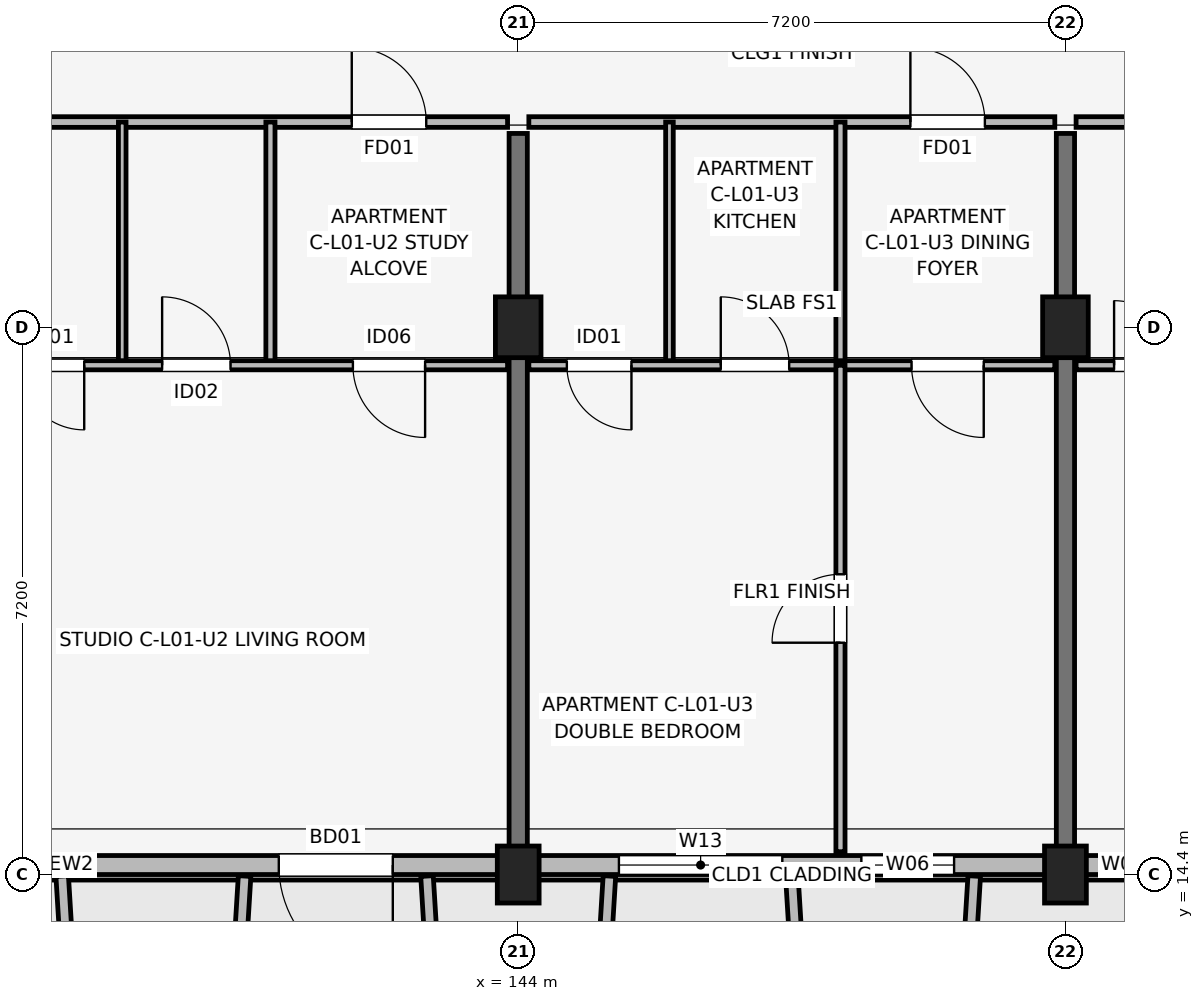
"""IFC4 building model, lengths in metres.
Left out: names, types, materials, properties, quantities, classifications, styles, units other than length and angle.
Written with IfcOpenShell. Run it as: python <this file> out.ifc"""

import sys

from ifc_helpers import new_model, si_unit, direction, frame, frame_2d, origin, origin_2d, place, context, subcontext, project, spatial, rectangle, extrude, element, fill, save


model = new_model("IFC4")
c1 = context("Model", 3, precision=1e-05, world=origin(), true_north=direction((0.0, 1.0)))
c2 = subcontext(c1, "Body", "Model", "MODEL_VIEW")
j1 = project(units=[si_unit("LENGTHUNIT", "METRE"), si_unit("PLANEANGLEUNIT", "RADIAN")], contexts=[c1])
p1 = place(None, origin())
s1 = spatial("IfcSite", under=j1, at=p1, CompositionType="ELEMENT")
p2 = place(p1, origin())
s2 = spatial("IfcBuilding", under=s1, at=p2, CompositionType="ELEMENT")
p3 = place(p2, frame((0.0, 0.0, 4.5)))
s3 = spatial("IfcBuildingStorey", under=s2, at=p3, CompositionType="ELEMENT", Elevation=4.5)
p4 = place(p3, frame((144.0, 14.4, 0.0), z_axis=(0.0, 0.0, 1.0), x_axis=(1.0, 0.0, 0.0)))
e1 = element("IfcColumn", 1, at=p4, inside=s3, PredefinedType="COLUMN", context=c2, shape_type="SweptSolid", body=[
    extrude(rectangle(XDim=0.55, YDim=0.75, at=origin_2d()), origin(), (0.0, 0.0, 1.0), 4.2),
])
p5 = place(p3, frame((144.0, 21.6, 0.0), z_axis=(0.0, 0.0, 1.0), x_axis=(1.0, 0.0, 0.0)))
e2 = element("IfcColumn", 2, at=p5, inside=s3, PredefinedType="COLUMN", context=c2, shape_type="SweptSolid", body=[
    extrude(rectangle(XDim=0.6, YDim=0.8, at=origin_2d()), origin(), (0.0, 0.0, 1.0), 4.2),
])
p6 = place(p3, frame((151.2, 14.4, 0.0), z_axis=(0.0, 0.0, 1.0), x_axis=(1.0, 0.0, 0.0)))
e3 = element("IfcColumn", 3, at=p6, inside=s3, PredefinedType="COLUMN", context=c2, shape_type="SweptSolid", body=[
    extrude(rectangle(XDim=0.55, YDim=0.75, at=origin_2d()), origin(), (0.0, 0.0, 1.0), 4.2),
])
p7 = place(p3, frame((151.2, 21.6, 0.0), z_axis=(0.0, 0.0, 1.0), x_axis=(1.0, 0.0, 0.0)))
e4 = element("IfcColumn", 4, at=p7, inside=s3, PredefinedType="COLUMN", context=c2, shape_type="SweptSolid", body=[
    extrude(rectangle(XDim=0.6, YDim=0.8, at=origin_2d()), origin(), (0.0, 0.0, 1.0), 4.2),
])
for number, where, z_axis, x_axis in (
    (5, (144.0, 14.75, 0.0), (0.0, 0.0, 1.0), (0.0, 1.0, 0.0)),
    (6, (151.2, 14.75, 0.0), (0.0, 0.0, 1.0), (0.0, 1.0, 0.0)),
):
    element("IfcWall", number, at=place(p3, frame(where, z_axis=z_axis, x_axis=x_axis)), inside=s3, PredefinedType="SHEAR", context=c2, shape_type="SweptSolid", body=[
        extrude(rectangle(XDim=9.4, YDim=0.24, at=frame_2d((4.7, 0.0))), origin(), (0.0, 0.0, 1.0), 4.2),
    ])
p8 = place(p3, frame((132.6, 14.525, 0.0), z_axis=(0.0, 0.0, 1.0), x_axis=(1.0, 0.0, 0.0)))
e7 = element("IfcWall", 7, at=p8, inside=s3, PredefinedType="SOLIDWALL", context=c2, shape_type="SweptSolid", body=[
    extrude(rectangle(XDim=30.0, YDim=0.25, at=frame_2d((15.0, 0.0))), origin(), (0.0, 0.0, 1.0), 3.48),
])
p9 = place(p8, frame((9.75, 0.0, 0.0), z_axis=(0.0, 0.0, 1.0), x_axis=(-1.0, 0.0, 0.0)))
e8 = element("IfcOpeningElement", 8, at=p9, cuts=e7, PredefinedType="OPENING", context=c2, shape_type="SweptSolid", body=[
    extrude(rectangle(XDim=1.5, YDim=2.15, at=frame_2d((0.75, 1.075))), frame((0.0, 0.135, 0.0), z_axis=(0.0, -1.0, 0.0), x_axis=(1.0, 0.0, 0.0)), (0.0, 0.0, 1.0), 0.27),
])
p10 = place(p8, frame((24.3, 0.0, 0.0), z_axis=(0.0, 0.0, 1.0), x_axis=(-1.0, 0.0, 0.0)))
e9 = element("IfcOpeningElement", 9, at=p10, cuts=e7, PredefinedType="OPENING", context=c2, shape_type="SweptSolid", body=[
    extrude(rectangle(XDim=1.8, YDim=2.15, at=frame_2d((0.9, 1.075))), frame((0.0, 0.135, 0.0), z_axis=(0.0, -1.0, 0.0), x_axis=(1.0, 0.0, 0.0)), (0.0, 0.0, 1.0), 0.27),
])
p11 = place(p8, frame((0.8, 0.0, 0.7)))
e10 = element("IfcOpeningElement", 10, at=p11, cuts=e7, PredefinedType="OPENING", context=c2, shape_type="SweptSolid", body=[
    extrude(rectangle(XDim=2.0, YDim=1.65, at=frame_2d((1.0, 0.825))), frame((0.0, 0.135, 0.0), z_axis=(0.0, -1.0, 0.0), x_axis=(1.0, 0.0, 0.0)), (0.0, 0.0, 1.0), 0.27),
])
p12 = place(p8, frame((12.725, 0.0, 0.7)))
e11 = element("IfcOpeningElement", 11, at=p12, cuts=e7, PredefinedType="OPENING", context=c2, shape_type="SweptSolid", body=[
    extrude(rectangle(XDim=2.15, YDim=1.65, at=frame_2d((1.075, 0.825))), frame((0.0, 0.135, 0.0), z_axis=(0.0, -1.0, 0.0), x_axis=(1.0, 0.0, 0.0)), (0.0, 0.0, 1.0), 0.27),
])
p13 = place(p8, frame((15.915, 0.0, 0.75)))
e12 = element("IfcOpeningElement", 12, at=p13, cuts=e7, PredefinedType="OPENING", context=c2, shape_type="SweptSolid", body=[
    extrude(rectangle(XDim=1.22, YDim=1.5, at=frame_2d((0.61, 0.75))), frame((0.0, 0.135, 0.0), z_axis=(0.0, -1.0, 0.0), x_axis=(1.0, 0.0, 0.0)), (0.0, 0.0, 1.0), 0.27),
])
p14 = place(p8, frame((19.058, 0.0, 0.75)))
e13 = element("IfcOpeningElement", 13, at=p14, cuts=e7, PredefinedType="OPENING", context=c2, shape_type="SweptSolid", body=[
    extrude(rectangle(XDim=0.6, YDim=1.25, at=frame_2d((0.3, 0.625))), frame((0.0, 0.135, 0.0), z_axis=(0.0, -1.0, 0.0), x_axis=(1.0, 0.0, 0.0)), (0.0, 0.0, 1.0), 0.27),
])
p15 = place(p8, frame((26.258, 0.0, 0.75)))
e14 = element("IfcOpeningElement", 14, at=p15, cuts=e7, PredefinedType="OPENING", context=c2, shape_type="SweptSolid", body=[
    extrude(rectangle(XDim=0.6, YDim=1.25, at=frame_2d((0.3, 0.625))), frame((0.0, 0.135, 0.0), z_axis=(0.0, -1.0, 0.0), x_axis=(1.0, 0.0, 0.0)), (0.0, 0.0, 1.0), 0.27),
])
p16 = place(p8, frame((28.3, 0.0, 0.75)))
e15 = element("IfcOpeningElement", 15, at=p16, cuts=e7, PredefinedType="OPENING", context=c2, shape_type="SweptSolid", body=[
    extrude(rectangle(XDim=0.6, YDim=1.25, at=frame_2d((0.3, 0.625))), frame((0.0, 0.135, 0.0), z_axis=(0.0, -1.0, 0.0), x_axis=(1.0, 0.0, 0.0)), (0.0, 0.0, 1.0), 0.27),
])
for number, where, z_axis, x_axis in (
    (16, (138.0, 14.38, 0.0), (0.0, 0.0, 1.0), (0.061, -0.998, 0.0)),
    (17, (140.4, 14.38, 0.0), (0.0, 0.0, 1.0), (-0.061, -0.998, 0.0)),
    (18, (142.8, 14.38, 0.0), (0.0, 0.0, 1.0), (0.061, -0.998, 0.0)),
):
    element("IfcWall", number, at=place(p3, frame(where, z_axis=z_axis, x_axis=x_axis)), inside=s3, PredefinedType="ELEMENTEDWALL", context=c2, shape_type="SweptSolid", body=[
        extrude(rectangle(XDim=1.964, YDim=0.165, at=frame_2d((0.982, 0.0))), origin(), (0.0, 0.0, 1.0), 3.5),
    ])
for number, where, z_axis, x_axis in (
    (19, (145.2, 14.38, 0.0), (0.0, 0.0, 1.0), (-0.061, -0.998, 0.0)),
    (20, (147.6, 14.38, 0.0), (0.0, 0.0, 1.0), (0.061, -0.998, 0.0)),
    (21, (150.0, 14.38, 0.0), (0.0, 0.0, 1.0), (-0.061, -0.998, 0.0)),
):
    element("IfcWall", number, at=place(p3, frame(where, z_axis=z_axis, x_axis=x_axis)), inside=s3, PredefinedType="ELEMENTEDWALL", context=c2, shape_type="SweptSolid", body=[
        extrude(rectangle(XDim=1.964, YDim=0.165, at=frame_2d((0.982, 0.0))), origin(), (0.0, 0.0, 1.0), 3.53),
    ])
p17 = place(p3, frame((136.94, 24.3, 0.0), z_axis=(0.0, 0.0, 1.0), x_axis=(1.0, 0.0, 0.0)))
e22 = element("IfcWall", 22, at=p17, inside=s3, PredefinedType="PARTITIONING", context=c2, shape_type="SweptSolid", body=[
    extrude(rectangle(XDim=6.92, YDim=0.14, at=frame_2d((3.46, 0.0))), origin(), (0.0, 0.0, 1.0), 3.25),
])
p18 = place(p17, frame((4.87, 0.0, 0.0)))
e23 = element("IfcOpeningElement", 23, at=p18, cuts=e22, PredefinedType="OPENING", context=c2, shape_type="SweptSolid", body=[
    extrude(rectangle(XDim=0.98, YDim=2.1, at=frame_2d((0.49, 1.05))), frame((0.0, 0.08, 0.0), z_axis=(0.0, -1.0, 0.0), x_axis=(1.0, 0.0, 0.0)), (0.0, 0.0, 1.0), 0.16),
])
p19 = place(p3, frame((138.79, 21.1, 0.0), z_axis=(0.0, 0.0, 1.0), x_axis=(0.0, 1.0, 0.0)))
e24 = element("IfcWall", 24, at=p19, inside=s3, PredefinedType="PARTITIONING", context=c2, shape_type="SweptSolid", body=[
    extrude(rectangle(XDim=3.2, YDim=0.1, at=frame_2d((1.6, 0.0))), origin(), (0.0, 0.0, 1.0), 3.25),
])
p20 = place(p3, frame((140.74, 21.1, 0.0), z_axis=(0.0, 0.0, 1.0), x_axis=(0.0, 1.0, 0.0)))
e25 = element("IfcWall", 25, at=p20, inside=s3, PredefinedType="PARTITIONING", context=c2, shape_type="SweptSolid", body=[
    extrude(rectangle(XDim=3.2, YDim=0.12, at=frame_2d((1.6, 0.0))), origin(), (0.0, 0.0, 1.0), 3.25),
])
p21 = place(p3, frame((136.94, 21.1, 0.0), z_axis=(0.0, 0.0, 1.0), x_axis=(1.0, 0.0, 0.0)))
e26 = element("IfcWall", 26, at=p21, inside=s3, PredefinedType="PARTITIONING", context=c2, shape_type="SweptSolid", body=[
    extrude(rectangle(XDim=6.92, YDim=0.12, at=frame_2d((3.46, 0.0))), origin(), (0.0, 0.0, 1.0), 3.25),
])
p22 = place(p21, frame((1.35, 0.0, 0.0), z_axis=(0.0, 0.0, 1.0), x_axis=(-1.0, 0.0, 0.0)))
e27 = element("IfcOpeningElement", 27, at=p22, cuts=e26, PredefinedType="OPENING", context=c2, shape_type="SweptSolid", body=[
    extrude(rectangle(XDim=0.85, YDim=2.08, at=frame_2d((0.425, 1.04))), frame((0.0, 0.07, 0.0), z_axis=(0.0, -1.0, 0.0), x_axis=(1.0, 0.0, 0.0)), (0.0, 0.0, 1.0), 0.14),
])
p23 = place(p21, frame((2.375, 0.0, 0.0)))
e28 = element("IfcOpeningElement", 28, at=p23, cuts=e26, PredefinedType="OPENING", context=c2, shape_type="SweptSolid", body=[
    extrude(rectangle(XDim=0.9, YDim=2.08, at=frame_2d((0.45, 1.04))), frame((0.0, 0.07, 0.0), z_axis=(0.0, -1.0, 0.0), x_axis=(1.0, 0.0, 0.0)), (0.0, 0.0, 1.0), 0.14),
])
p24 = place(p21, frame((5.835, 0.0, 0.0), z_axis=(0.0, 0.0, 1.0), x_axis=(-1.0, 0.0, 0.0)))
e29 = element("IfcOpeningElement", 29, at=p24, cuts=e26, PredefinedType="OPENING", context=c2, shape_type="SweptSolid", body=[
    extrude(rectangle(XDim=0.95, YDim=2.08, at=frame_2d((0.475, 1.04))), frame((0.0, 0.07, 0.0), z_axis=(0.0, -1.0, 0.0), x_axis=(1.0, 0.0, 0.0)), (0.0, 0.0, 1.0), 0.14),
])
p25 = place(p3, frame((144.14, 24.3, 0.0), z_axis=(0.0, 0.0, 1.0), x_axis=(1.0, 0.0, 0.0)))
e30 = element("IfcWall", 30, at=p25, inside=s3, PredefinedType="PARTITIONING", context=c2, shape_type="SweptSolid", body=[
    extrude(rectangle(XDim=6.92, YDim=0.14, at=frame_2d((3.46, 0.0))), origin(), (0.0, 0.0, 1.0), 3.25),
])
p26 = place(p25, frame((5.02, 0.0, 0.0)))
e31 = element("IfcOpeningElement", 31, at=p26, cuts=e30, PredefinedType="OPENING", context=c2, shape_type="SweptSolid", body=[
    extrude(rectangle(XDim=0.98, YDim=2.1, at=frame_2d((0.49, 1.05))), frame((0.0, 0.08, 0.0), z_axis=(0.0, -1.0, 0.0), x_axis=(1.0, 0.0, 0.0)), (0.0, 0.0, 1.0), 0.16),
])
p27 = place(p3, frame((145.99, 21.1, 0.0), z_axis=(0.0, 0.0, 1.0), x_axis=(0.0, 1.0, 0.0)))
e32 = element("IfcWall", 32, at=p27, inside=s3, PredefinedType="PARTITIONING", context=c2, shape_type="SweptSolid", body=[
    extrude(rectangle(XDim=3.2, YDim=0.1, at=frame_2d((1.6, 0.0))), origin(), (0.0, 0.0, 1.0), 3.25),
])
p28 = place(p3, frame((148.24, 21.1, 0.0), z_axis=(0.0, 0.0, 1.0), x_axis=(0.0, 1.0, 0.0)))
e33 = element("IfcWall", 33, at=p28, inside=s3, PredefinedType="PARTITIONING", context=c2, shape_type="SweptSolid", body=[
    extrude(rectangle(XDim=3.2, YDim=0.12, at=frame_2d((1.6, 0.0))), origin(), (0.0, 0.0, 1.0), 3.25),
])
p29 = place(p3, frame((144.14, 21.1, 0.0), z_axis=(0.0, 0.0, 1.0), x_axis=(1.0, 0.0, 0.0)))
e34 = element("IfcWall", 34, at=p29, inside=s3, PredefinedType="PARTITIONING", context=c2, shape_type="SweptSolid", body=[
    extrude(rectangle(XDim=6.92, YDim=0.12, at=frame_2d((3.46, 0.0))), origin(), (0.0, 0.0, 1.0), 3.25),
])
p30 = place(p29, frame((1.35, 0.0, 0.0), z_axis=(0.0, 0.0, 1.0), x_axis=(-1.0, 0.0, 0.0)))
e35 = element("IfcOpeningElement", 35, at=p30, cuts=e34, PredefinedType="OPENING", context=c2, shape_type="SweptSolid", body=[
    extrude(rectangle(XDim=0.85, YDim=2.08, at=frame_2d((0.425, 1.04))), frame((0.0, 0.07, 0.0), z_axis=(0.0, -1.0, 0.0), x_axis=(1.0, 0.0, 0.0)), (0.0, 0.0, 1.0), 0.14),
])
p31 = place(p29, frame((2.525, 0.0, 0.0)))
e36 = element("IfcOpeningElement", 36, at=p31, cuts=e34, PredefinedType="OPENING", context=c2, shape_type="SweptSolid", body=[
    extrude(rectangle(XDim=0.9, YDim=2.08, at=frame_2d((0.45, 1.04))), frame((0.0, 0.07, 0.0), z_axis=(0.0, -1.0, 0.0), x_axis=(1.0, 0.0, 0.0)), (0.0, 0.0, 1.0), 0.14),
])
p32 = place(p29, frame((5.985, 0.0, 0.0), z_axis=(0.0, 0.0, 1.0), x_axis=(-1.0, 0.0, 0.0)))
e37 = element("IfcOpeningElement", 37, at=p32, cuts=e34, PredefinedType="OPENING", context=c2, shape_type="SweptSolid", body=[
    extrude(rectangle(XDim=0.95, YDim=2.08, at=frame_2d((0.475, 1.04))), frame((0.0, 0.07, 0.0), z_axis=(0.0, -1.0, 0.0), x_axis=(1.0, 0.0, 0.0)), (0.0, 0.0, 1.0), 0.14),
])
p33 = place(p3, frame((148.24, 14.7, 0.0), z_axis=(0.0, 0.0, 1.0), x_axis=(0.0, 1.0, 0.0)))
e38 = element("IfcWall", 38, at=p33, inside=s3, PredefinedType="PARTITIONING", context=c2, shape_type="SweptSolid", body=[
    extrude(rectangle(XDim=6.4, YDim=0.12, at=frame_2d((3.2, 0.0))), origin(), (0.0, 0.0, 1.0), 3.25),
])
p34 = place(p33, frame((2.75, 0.0, 0.0)))
e39 = element("IfcOpeningElement", 39, at=p34, cuts=e38, PredefinedType="OPENING", context=c2, shape_type="SweptSolid", body=[
    extrude(rectangle(XDim=0.9, YDim=2.08, at=frame_2d((0.45, 1.04))), frame((0.0, 0.07, 0.0), z_axis=(0.0, -1.0, 0.0), x_axis=(1.0, 0.0, 0.0)), (0.0, 0.0, 1.0), 0.14),
])
p35 = place(p3, frame((151.34, 24.3, 0.0), z_axis=(0.0, 0.0, 1.0), x_axis=(1.0, 0.0, 0.0)))
e40 = element("IfcWall", 40, at=p35, inside=s3, PredefinedType="PARTITIONING", context=c2, shape_type="SweptSolid", body=[
    extrude(rectangle(XDim=6.92, YDim=0.14, at=frame_2d((3.46, 0.0))), origin(), (0.0, 0.0, 1.0), 3.25),
])
p36 = place(p35, frame((5.85, 0.0, 0.0), z_axis=(0.0, 0.0, 1.0), x_axis=(-1.0, 0.0, 0.0)))
e41 = element("IfcOpeningElement", 41, at=p36, cuts=e40, PredefinedType="OPENING", context=c2, shape_type="SweptSolid", body=[
    extrude(rectangle(XDim=0.98, YDim=2.1, at=frame_2d((0.49, 1.05))), frame((0.0, 0.08, 0.0), z_axis=(0.0, -1.0, 0.0), x_axis=(1.0, 0.0, 0.0)), (0.0, 0.0, 1.0), 0.16),
])
p37 = place(p3, frame((151.34, 21.1, 0.0), z_axis=(0.0, 0.0, 1.0), x_axis=(1.0, 0.0, 0.0)))
e42 = element("IfcWall", 42, at=p37, inside=s3, PredefinedType="PARTITIONING", context=c2, shape_type="SweptSolid", body=[
    extrude(rectangle(XDim=6.92, YDim=0.12, at=frame_2d((3.46, 0.0))), origin(), (0.0, 0.0, 1.0), 3.25),
])
p38 = place(p37, frame((0.5, 0.0, 0.0)))
e43 = element("IfcOpeningElement", 43, at=p38, cuts=e42, PredefinedType="OPENING", context=c2, shape_type="SweptSolid", body=[
    extrude(rectangle(XDim=0.85, YDim=2.08, at=frame_2d((0.425, 1.04))), frame((0.0, 0.07, 0.0), z_axis=(0.0, -1.0, 0.0), x_axis=(1.0, 0.0, 0.0)), (0.0, 0.0, 1.0), 0.14),
])
p39 = place(p37, frame((3.275, 0.0, 0.0), z_axis=(0.0, 0.0, 1.0), x_axis=(-1.0, 0.0, 0.0)))
e44 = element("IfcOpeningElement", 44, at=p39, cuts=e42, PredefinedType="OPENING", context=c2, shape_type="SweptSolid", body=[
    extrude(rectangle(XDim=0.9, YDim=2.08, at=frame_2d((0.45, 1.04))), frame((0.0, 0.07, 0.0), z_axis=(0.0, -1.0, 0.0), x_axis=(1.0, 0.0, 0.0)), (0.0, 0.0, 1.0), 0.14),
])
p40 = place(p37, frame((4.885, 0.0, 0.0)))
e45 = element("IfcOpeningElement", 45, at=p40, cuts=e42, PredefinedType="OPENING", context=c2, shape_type="SweptSolid", body=[
    extrude(rectangle(XDim=0.95, YDim=2.08, at=frame_2d((0.475, 1.04))), frame((0.0, 0.07, 0.0), z_axis=(0.0, -1.0, 0.0), x_axis=(1.0, 0.0, 0.0)), (0.0, 0.0, 1.0), 0.14),
])
p41 = place(p9, origin())
e46 = element("IfcDoor", 46, at=p41, inside=s3, OperationType="SINGLE_SWING_RIGHT", PredefinedType="DOOR", context=c2, shape_type="SweptSolid", body=[
    extrude(rectangle(XDim=1.5, YDim=2.15, at=frame_2d((0.75, 1.075))), frame((0.0, 0.025, 0.0), z_axis=(0.0, -1.0, 0.0), x_axis=(1.0, 0.0, 0.0)), (0.0, 0.0, 1.0), 0.05),
])
fill(e8, e46)
p42 = place(p12, origin())
e47 = element("IfcWindow", 47, at=p42, inside=s3, PartitioningType="SINGLE_PANEL", PredefinedType="WINDOW", context=c2, shape_type="SweptSolid", body=[
    extrude(rectangle(XDim=2.15, YDim=1.65, at=frame_2d((1.075, 0.825))), frame((0.0, 0.03, 0.0), z_axis=(0.0, -1.0, 0.0), x_axis=(1.0, 0.0, 0.0)), (0.0, 0.0, 1.0), 0.06),
])
fill(e11, e47)
p43 = place(p13, origin())
e48 = element("IfcWindow", 48, at=p43, inside=s3, PartitioningType="SINGLE_PANEL", PredefinedType="WINDOW", context=c2, shape_type="SweptSolid", body=[
    extrude(rectangle(XDim=1.22, YDim=1.5, at=frame_2d((0.61, 0.75))), frame((0.0, 0.03, 0.0), z_axis=(0.0, -1.0, 0.0), x_axis=(1.0, 0.0, 0.0)), (0.0, 0.0, 1.0), 0.06),
])
fill(e12, e48)
p44 = place(p14, origin())
e49 = element("IfcWindow", 49, at=p44, inside=s3, PartitioningType="SINGLE_PANEL", PredefinedType="WINDOW", context=c2, shape_type="SweptSolid", body=[
    extrude(rectangle(XDim=0.6, YDim=1.25, at=frame_2d((0.3, 0.625))), frame((0.0, 0.03, 0.0), z_axis=(0.0, -1.0, 0.0), x_axis=(1.0, 0.0, 0.0)), (0.0, 0.0, 1.0), 0.06),
])
fill(e13, e49)
p45 = place(p18, origin())
e50 = element("IfcDoor", 50, at=p45, inside=s3, OperationType="SINGLE_SWING_LEFT", PredefinedType="DOOR", context=c2, shape_type="SweptSolid", body=[
    extrude(rectangle(XDim=0.98, YDim=2.1, at=frame_2d((0.49, 1.05))), frame((0.0, 0.025, 0.0), z_axis=(0.0, -1.0, 0.0), x_axis=(1.0, 0.0, 0.0)), (0.0, 0.0, 1.0), 0.05),
])
fill(e23, e50)
p46 = place(p22, origin())
e51 = element("IfcDoor", 51, at=p46, inside=s3, OperationType="SINGLE_SWING_RIGHT", PredefinedType="DOOR", context=c2, shape_type="SweptSolid", body=[
    extrude(rectangle(XDim=0.85, YDim=2.08, at=frame_2d((0.425, 1.04))), frame((0.0, 0.025, 0.0), z_axis=(0.0, -1.0, 0.0), x_axis=(1.0, 0.0, 0.0)), (0.0, 0.0, 1.0), 0.05),
])
fill(e27, e51)
p47 = place(p23, origin())
e52 = element("IfcDoor", 52, at=p47, inside=s3, OperationType="SINGLE_SWING_LEFT", PredefinedType="DOOR", context=c2, shape_type="SweptSolid", body=[
    extrude(rectangle(XDim=0.9, YDim=2.08, at=frame_2d((0.45, 1.04))), frame((0.0, 0.025, 0.0), z_axis=(0.0, -1.0, 0.0), x_axis=(1.0, 0.0, 0.0)), (0.0, 0.0, 1.0), 0.05),
])
fill(e28, e52)
p48 = place(p24, origin())
e53 = element("IfcDoor", 53, at=p48, inside=s3, OperationType="SINGLE_SWING_RIGHT", PredefinedType="DOOR", context=c2, shape_type="SweptSolid", body=[
    extrude(rectangle(XDim=0.95, YDim=2.08, at=frame_2d((0.475, 1.04))), frame((0.0, 0.025, 0.0), z_axis=(0.0, -1.0, 0.0), x_axis=(1.0, 0.0, 0.0)), (0.0, 0.0, 1.0), 0.05),
])
fill(e29, e53)
p49 = place(p26, origin())
e54 = element("IfcDoor", 54, at=p49, inside=s3, OperationType="SINGLE_SWING_LEFT", PredefinedType="DOOR", context=c2, shape_type="SweptSolid", body=[
    extrude(rectangle(XDim=0.98, YDim=2.1, at=frame_2d((0.49, 1.05))), frame((0.0, 0.025, 0.0), z_axis=(0.0, -1.0, 0.0), x_axis=(1.0, 0.0, 0.0)), (0.0, 0.0, 1.0), 0.05),
])
fill(e31, e54)
p50 = place(p30, origin())
e55 = element("IfcDoor", 55, at=p50, inside=s3, OperationType="SINGLE_SWING_RIGHT", PredefinedType="DOOR", context=c2, shape_type="SweptSolid", body=[
    extrude(rectangle(XDim=0.85, YDim=2.08, at=frame_2d((0.425, 1.04))), frame((0.0, 0.025, 0.0), z_axis=(0.0, -1.0, 0.0), x_axis=(1.0, 0.0, 0.0)), (0.0, 0.0, 1.0), 0.05),
])
fill(e35, e55)
p51 = place(p31, origin())
e56 = element("IfcDoor", 56, at=p51, inside=s3, OperationType="SINGLE_SWING_LEFT", PredefinedType="DOOR", context=c2, shape_type="SweptSolid", body=[
    extrude(rectangle(XDim=0.9, YDim=2.08, at=frame_2d((0.45, 1.04))), frame((0.0, 0.025, 0.0), z_axis=(0.0, -1.0, 0.0), x_axis=(1.0, 0.0, 0.0)), (0.0, 0.0, 1.0), 0.05),
])
fill(e36, e56)
p52 = place(p32, origin())
e57 = element("IfcDoor", 57, at=p52, inside=s3, OperationType="SINGLE_SWING_RIGHT", PredefinedType="DOOR", context=c2, shape_type="SweptSolid", body=[
    extrude(rectangle(XDim=0.95, YDim=2.08, at=frame_2d((0.475, 1.04))), frame((0.0, 0.025, 0.0), z_axis=(0.0, -1.0, 0.0), x_axis=(1.0, 0.0, 0.0)), (0.0, 0.0, 1.0), 0.05),
])
fill(e37, e57)
p53 = place(p34, origin())
e58 = element("IfcDoor", 58, at=p53, inside=s3, OperationType="SINGLE_SWING_LEFT", PredefinedType="DOOR", context=c2, shape_type="SweptSolid", body=[
    extrude(rectangle(XDim=0.9, YDim=2.08, at=frame_2d((0.45, 1.04))), frame((0.0, 0.025, 0.0), z_axis=(0.0, -1.0, 0.0), x_axis=(1.0, 0.0, 0.0)), (0.0, 0.0, 1.0), 0.05),
])
fill(e39, e58)
p54 = place(p38, origin())
e59 = element("IfcDoor", 59, at=p54, inside=s3, OperationType="SINGLE_SWING_LEFT", PredefinedType="DOOR", context=c2, shape_type="SweptSolid", body=[
    extrude(rectangle(XDim=0.85, YDim=2.08, at=frame_2d((0.425, 1.04))), frame((0.0, 0.025, 0.0), z_axis=(0.0, -1.0, 0.0), x_axis=(1.0, 0.0, 0.0)), (0.0, 0.0, 1.0), 0.05),
])
fill(e43, e59)
save(model, sys.argv[1])
